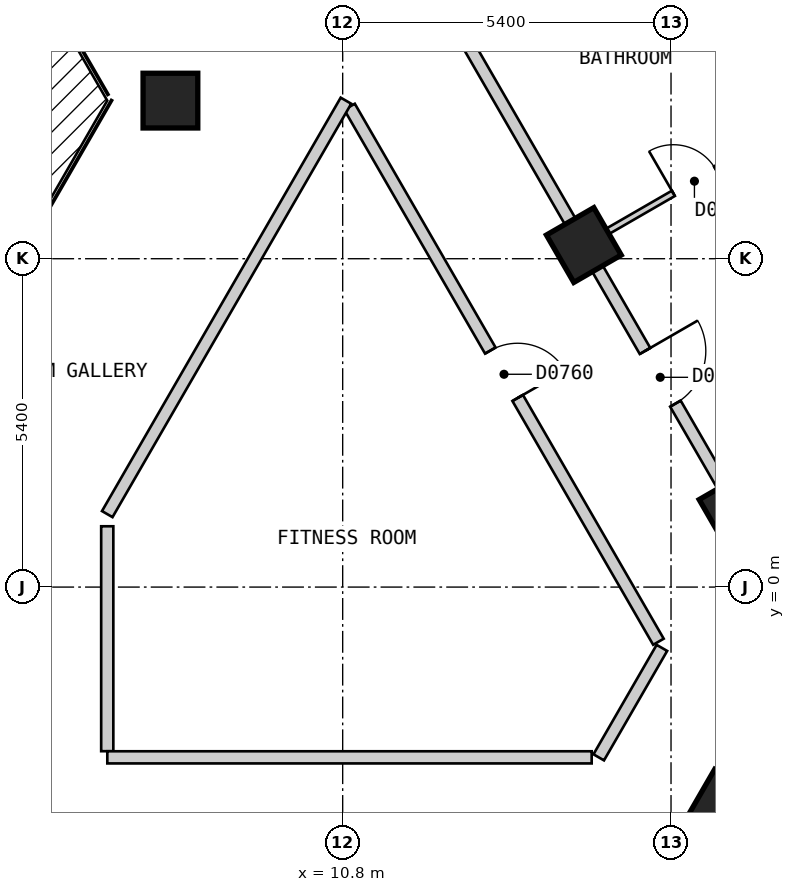
"""IFC4 building model, lengths in metres.
Left out: names, types, materials, properties, quantities, classifications, styles, units other than length and angle.
Written with IfcOpenShell. Run it as: python <this file> out.ifc"""

import sys

from ifc_helpers import new_model, si_unit, direction, frame, frame_2d, origin, origin_2d, place, context, subcontext, project, spatial, polyline, rectangle, outline, extrude, element, fill, save


model = new_model("IFC4")
c1 = context("Model", 3, precision=1e-05, world=origin(), true_north=direction((0.0, 1.0)))
c2 = subcontext(c1, "Body", "Model", "MODEL_VIEW")
j1 = project(units=[si_unit("LENGTHUNIT", "METRE"), si_unit("PLANEANGLEUNIT", "RADIAN")], contexts=[c1])
p1 = place(None, origin())
s1 = spatial("IfcSite", under=j1, at=p1, CompositionType="ELEMENT")
p2 = place(p1, origin())
s2 = spatial("IfcBuilding", under=s1, at=p2, CompositionType="ELEMENT")
p3 = place(p2, frame((0.0, 0.0, 99.0)))
s3 = spatial("IfcBuildingStorey", under=s2, at=p3, CompositionType="ELEMENT", Elevation=99.0)
for number, where, z_axis, x_axis in (
    (1, (17.083, -3.612, 0.0), (0.0, 0.0, 1.0), (0.5, 0.866, 0.0)),
    (2, (17.278, 1.274, 0.0), (0.0, 0.0, 1.0), (-0.5, 0.866, 0.0)),
    (3, (14.766, 5.625, 0.0), (0.0, 0.0, 1.0), (-0.5, 0.866, 0.0)),
    (4, (7.967, 8.0, 0.0), (0.0, 0.0, 1.0), (1.0, 0.0, 0.0)),
):
    element("IfcColumn", number, at=place(p3, frame(where, z_axis=z_axis, x_axis=x_axis)), inside=s3, PredefinedType="COLUMN", context=c2, shape_type="SweptSolid", body=[
        extrude(rectangle(XDim=0.9, YDim=0.9, at=origin_2d()), origin(), (0.0, 0.0, 1.0), 3.0),
    ])
p4 = place(p3, frame((29.027, 1.425, 0.0), z_axis=(0.0, 0.0, 1.0), x_axis=(-0.500027479704, 0.866009537788, 0.0)))
e5 = element("IfcWall", 5, at=p4, inside=s3, PredefinedType="SOLIDWALL", context=c2, shape_type="SweptSolid", body=[
    extrude(outline(polyline([(0.0, -0.15), (26.559, -0.15), (26.478, 0.15), (0.08, 0.15), (0.0, -0.15)])), origin(), (0.0, 0.0, 1.0), 2.7),
])
p5 = place(p4, frame((1.227, 0.0, 0.15)))
e6 = element("IfcOpeningElement", 6, at=p5, cuts=e5, PredefinedType="OPENING", context=c2, shape_type="SweptSolid", body=[
    extrude(rectangle(XDim=1.5, YDim=2.1, at=frame_2d((0.75, 1.05))), frame((0.0, 0.16, 0.0), z_axis=(0.0, -1.0, 0.0), x_axis=(1.0, 0.0, 0.0)), (0.0, 0.0, 1.0), 0.32),
])
p6 = place(p4, frame((3.738, 0.0, 0.15)))
e7 = element("IfcOpeningElement", 7, at=p6, cuts=e5, PredefinedType="OPENING", context=c2, shape_type="SweptSolid", body=[
    extrude(rectangle(XDim=1.5, YDim=2.1, at=frame_2d((0.75, 1.05))), frame((0.0, 0.16, 0.0), z_axis=(0.0, -1.0, 0.0), x_axis=(1.0, 0.0, 0.0)), (0.0, 0.0, 1.0), 0.32),
])
p7 = place(p4, frame((6.25, 0.0, 0.15)))
e8 = element("IfcOpeningElement", 8, at=p7, cuts=e5, PredefinedType="OPENING", context=c2, shape_type="SweptSolid", body=[
    extrude(rectangle(XDim=1.5, YDim=2.1, at=frame_2d((0.75, 1.05))), frame((0.0, 0.16, 0.0), z_axis=(0.0, -1.0, 0.0), x_axis=(1.0, 0.0, 0.0)), (0.0, 0.0, 1.0), 0.32),
])
p8 = place(p4, frame((8.761, 0.0, 0.15)))
e9 = element("IfcOpeningElement", 9, at=p8, cuts=e5, PredefinedType="OPENING", context=c2, shape_type="SweptSolid", body=[
    extrude(rectangle(XDim=1.5, YDim=2.1, at=frame_2d((0.75, 1.05))), frame((0.0, 0.16, 0.0), z_axis=(0.0, -1.0, 0.0), x_axis=(1.0, 0.0, 0.0)), (0.0, 0.0, 1.0), 0.32),
])
p9 = place(p4, frame((11.273, 0.0, 0.15)))
e10 = element("IfcOpeningElement", 10, at=p9, cuts=e5, PredefinedType="OPENING", context=c2, shape_type="SweptSolid", body=[
    extrude(rectangle(XDim=1.5, YDim=2.1, at=frame_2d((0.75, 1.05))), frame((0.0, 0.16, 0.0), z_axis=(0.0, -1.0, 0.0), x_axis=(1.0, 0.0, 0.0)), (0.0, 0.0, 1.0), 0.32),
])
p10 = place(p4, frame((13.785, 0.0, 0.15)))
e11 = element("IfcOpeningElement", 11, at=p10, cuts=e5, PredefinedType="OPENING", context=c2, shape_type="SweptSolid", body=[
    extrude(rectangle(XDim=1.5, YDim=2.1, at=frame_2d((0.75, 1.05))), frame((0.0, 0.16, 0.0), z_axis=(0.0, -1.0, 0.0), x_axis=(1.0, 0.0, 0.0)), (0.0, 0.0, 1.0), 0.32),
])
p11 = place(p4, frame((16.296, 0.0, 0.15)))
e12 = element("IfcOpeningElement", 12, at=p11, cuts=e5, PredefinedType="OPENING", context=c2, shape_type="SweptSolid", body=[
    extrude(rectangle(XDim=1.5, YDim=2.1, at=frame_2d((0.75, 1.05))), frame((0.0, 0.16, 0.0), z_axis=(0.0, -1.0, 0.0), x_axis=(1.0, 0.0, 0.0)), (0.0, 0.0, 1.0), 0.32),
])
p12 = place(p4, frame((18.807, 0.0, 0.15)))
e13 = element("IfcOpeningElement", 13, at=p12, cuts=e5, PredefinedType="OPENING", context=c2, shape_type="SweptSolid", body=[
    extrude(rectangle(XDim=1.5, YDim=2.1, at=frame_2d((0.75, 1.05))), frame((0.0, 0.16, 0.0), z_axis=(0.0, -1.0, 0.0), x_axis=(1.0, 0.0, 0.0)), (0.0, 0.0, 1.0), 0.32),
])
p13 = place(p4, frame((21.319, 0.0, 0.15)))
e14 = element("IfcOpeningElement", 14, at=p13, cuts=e5, PredefinedType="OPENING", context=c2, shape_type="SweptSolid", body=[
    extrude(rectangle(XDim=1.5, YDim=2.1, at=frame_2d((0.75, 1.05))), frame((0.0, 0.16, 0.0), z_axis=(0.0, -1.0, 0.0), x_axis=(1.0, 0.0, 0.0)), (0.0, 0.0, 1.0), 0.32),
])
p14 = place(p4, frame((23.831, 0.0, 0.15)))
e15 = element("IfcOpeningElement", 15, at=p14, cuts=e5, PredefinedType="OPENING", context=c2, shape_type="SweptSolid", body=[
    extrude(rectangle(XDim=1.5, YDim=2.1, at=frame_2d((0.75, 1.05))), frame((0.0, 0.16, 0.0), z_axis=(0.0, -1.0, 0.0), x_axis=(1.0, 0.0, 0.0)), (0.0, 0.0, 1.0), 0.32),
])
p15 = place(p3, frame((10.913, 7.899, 0.0), z_axis=(0.0, 0.0, 1.0), x_axis=(0.500028940566, -0.866008694296, 0.0)))
e16 = element("IfcWall", 16, at=p15, inside=s3, PredefinedType="PARTITIONING", context=c2, shape_type="SweptSolid", body=[
    extrude(rectangle(XDim=10.159, YDim=0.2, at=frame_2d((5.08, 0.0))), origin(), (0.0, 0.0, 1.0), 2.7),
])
p16 = place(p15, frame((4.63, 0.0, 0.0)))
e17 = element("IfcOpeningElement", 17, at=p16, cuts=e16, PredefinedType="OPENING", context=c2, shape_type="SweptSolid", body=[
    extrude(rectangle(XDim=0.9, YDim=2.1, at=frame_2d((0.45, 1.05))), frame((0.0, 0.11, 0.0), z_axis=(0.0, -1.0, 0.0), x_axis=(1.0, 0.0, 0.0)), (0.0, 0.0, 1.0), 0.22),
])
p17 = place(p3, frame((8.488, 16.5, 0.0), z_axis=(0.0, 0.0, 1.0), x_axis=(0.499986836607, -0.86603300354, 0.0)))
e18 = element("IfcWall", 18, at=p17, inside=s3, PredefinedType="PARTITIONING", context=c2, shape_type="SweptSolid", body=[
    extrude(rectangle(XDim=20.09, YDim=0.2, at=frame_2d((10.045, 0.0))), origin(), (0.0, 0.0, 1.0), 2.7),
])
p18 = place(p17, frame((14.569, 0.0, 0.0)))
e19 = element("IfcOpeningElement", 19, at=p18, cuts=e18, PredefinedType="OPENING", context=c2, shape_type="SweptSolid", body=[
    extrude(rectangle(XDim=1.0, YDim=2.1, at=frame_2d((0.5, 1.05))), frame((0.0, 0.11, 0.0), z_axis=(0.0, -1.0, 0.0), x_axis=(1.0, 0.0, 0.0)), (0.0, 0.0, 1.0), 0.22),
])
p19 = place(p17, frame((4.547, 0.0, 0.0)))
e20 = element("IfcOpeningElement", 20, at=p19, cuts=e18, PredefinedType="OPENING", context=c2, shape_type="SweptSolid", body=[
    extrude(rectangle(XDim=1.0, YDim=2.1, at=frame_2d((0.5, 1.05))), frame((0.0, 0.11, 0.0), z_axis=(0.0, -1.0, 0.0), x_axis=(1.0, 0.0, 0.0)), (0.0, 0.0, 1.0), 0.22),
])
p20 = place(p3, frame((6.928, 1.0, 0.0), z_axis=(0.0, 0.0, 1.0), x_axis=(0.0, -1.0, 0.0)))
e21 = element("IfcWall", 21, at=p20, inside=s3, PredefinedType="PARTITIONING", context=c2, shape_type="SweptSolid", body=[
    extrude(rectangle(XDim=3.699, YDim=0.2, at=frame_2d((1.85, 0.0))), origin(), (0.0, 0.0, 1.0), 2.7),
])
p21 = place(p3, frame((6.929, -2.8, 0.0), z_axis=(0.0, 0.0, 1.0), x_axis=(1.0, 0.0, 0.0)))
e22 = element("IfcWall", 22, at=p21, inside=s3, PredefinedType="PARTITIONING", context=c2, shape_type="SweptSolid", body=[
    extrude(rectangle(XDim=7.966, YDim=0.2, at=frame_2d((3.983, 0.0))), origin(), (0.0, 0.0, 1.0), 2.7),
])
p22 = place(p3, frame((6.928, 1.2, 0.0), z_axis=(0.0, 0.0, 1.0), x_axis=(0.500055327065, 0.865993458332, 0.0)))
e23 = element("IfcWall", 23, at=p22, inside=s3, PredefinedType="PARTITIONING", context=c2, shape_type="SweptSolid", body=[
    extrude(rectangle(XDim=7.851, YDim=0.2, at=frame_2d((3.926, 0.0))), origin(), (0.0, 0.0, 1.0), 2.7),
])
p23 = place(p3, frame((15.011, -2.8, 0.0), z_axis=(0.0, 0.0, 1.0), x_axis=(0.499929208183, 0.866066271601, 0.0)))
e24 = element("IfcWall", 24, at=p23, inside=s3, PredefinedType="PARTITIONING", context=c2, shape_type="SweptSolid", body=[
    extrude(rectangle(XDim=2.078, YDim=0.2, at=frame_2d((1.039, 0.0))), origin(), (0.0, 0.0, 1.0), 2.7),
])
p24 = place(p3, frame((15.771, -5.884, 0.0), z_axis=(0.0, 0.0, 1.0), x_axis=(0.499917542299, 0.866073005526, 0.0)))
e25 = element("IfcWall", 25, at=p24, inside=s3, PredefinedType="PARTITIONING", context=c2, shape_type="SweptSolid", body=[
    extrude(rectangle(XDim=5.525, YDim=0.2, at=frame_2d((2.762, 0.0))), origin(), (0.0, 0.0, 1.0), 2.7),
])
p25 = place(p3, frame((15.942, 11.988, 0.0), z_axis=(0.0, 0.0, 1.0), x_axis=(0.499995794706, -0.866027831699, 0.0)))
e26 = element("IfcWall", 26, at=p25, inside=s3, PredefinedType="PARTITIONING", context=c2, shape_type="SweptSolid", body=[
    extrude(rectangle(XDim=4.922, YDim=0.1, at=frame_2d((2.461, 0.0))), origin(), (0.0, 0.0, 1.0), 2.7),
])
p26 = place(p3, frame((14.853, 5.675, 0.0), z_axis=(0.0, 0.0, 1.0), x_axis=(0.866016855193, 0.500014806302, 0.0)))
e27 = element("IfcWall", 27, at=p26, inside=s3, PredefinedType="PARTITIONING", context=c2, shape_type="SweptSolid", body=[
    extrude(rectangle(XDim=10.0, YDim=0.1, at=frame_2d((5.0, 0.0))), origin(), (0.0, 0.0, 1.0), 2.7),
])
p27 = place(p26, frame((1.6, 0.0, 0.0)))
e28 = element("IfcOpeningElement", 28, at=p27, cuts=e27, PredefinedType="OPENING", context=c2, shape_type="SweptSolid", body=[
    extrude(rectangle(XDim=0.8, YDim=2.1, at=frame_2d((0.4, 1.05))), frame((0.0, 0.06, 0.0), z_axis=(0.0, -1.0, 0.0), x_axis=(1.0, 0.0, 0.0)), (0.0, 0.0, 1.0), 0.12),
])
p28 = place(p26, frame((6.6, 0.0, 0.0)))
e29 = element("IfcOpeningElement", 29, at=p28, cuts=e27, PredefinedType="OPENING", context=c2, shape_type="SweptSolid", body=[
    extrude(rectangle(XDim=0.9, YDim=2.1, at=frame_2d((0.45, 1.05))), frame((0.0, 0.06, 0.0), z_axis=(0.0, -1.0, 0.0), x_axis=(1.0, 0.0, 0.0)), (0.0, 0.0, 1.0), 0.12),
])
p29 = place(p18, origin())
e30 = element("IfcDoor", 30, at=p29, inside=s3, OperationType="SINGLE_SWING_LEFT", PredefinedType="DOOR", context=c2, shape_type="SweptSolid", body=[
    extrude(rectangle(XDim=1.0, YDim=2.1, at=frame_2d((0.5, 1.05))), frame((0.0, 0.025, 0.0), z_axis=(0.0, -1.0, 0.0), x_axis=(1.0, 0.0, 0.0)), (0.0, 0.0, 1.0), 0.05),
])
fill(e19, e30)
p30 = place(p27, origin())
e31 = element("IfcDoor", 31, at=p30, inside=s3, OperationType="SINGLE_SWING_LEFT", PredefinedType="DOOR", context=c2, shape_type="SweptSolid", body=[
    extrude(rectangle(XDim=0.8, YDim=2.1, at=frame_2d((0.4, 1.05))), frame((0.0, 0.025, 0.0), z_axis=(0.0, -1.0, 0.0), x_axis=(1.0, 0.0, 0.0)), (0.0, 0.0, 1.0), 0.05),
])
fill(e28, e31)
p31 = place(p16, origin())
e32 = element("IfcDoor", 32, at=p31, inside=s3, OperationType="SINGLE_SWING_RIGHT", PredefinedType="DOOR", context=c2, shape_type="SweptSolid", body=[
    extrude(rectangle(XDim=0.9, YDim=2.1, at=frame_2d((0.45, 1.05))), frame((0.0, 0.025, 0.0), z_axis=(0.0, -1.0, 0.0), x_axis=(1.0, 0.0, 0.0)), (0.0, 0.0, 1.0), 0.05),
])
fill(e17, e32)
save(model, sys.argv[1])
